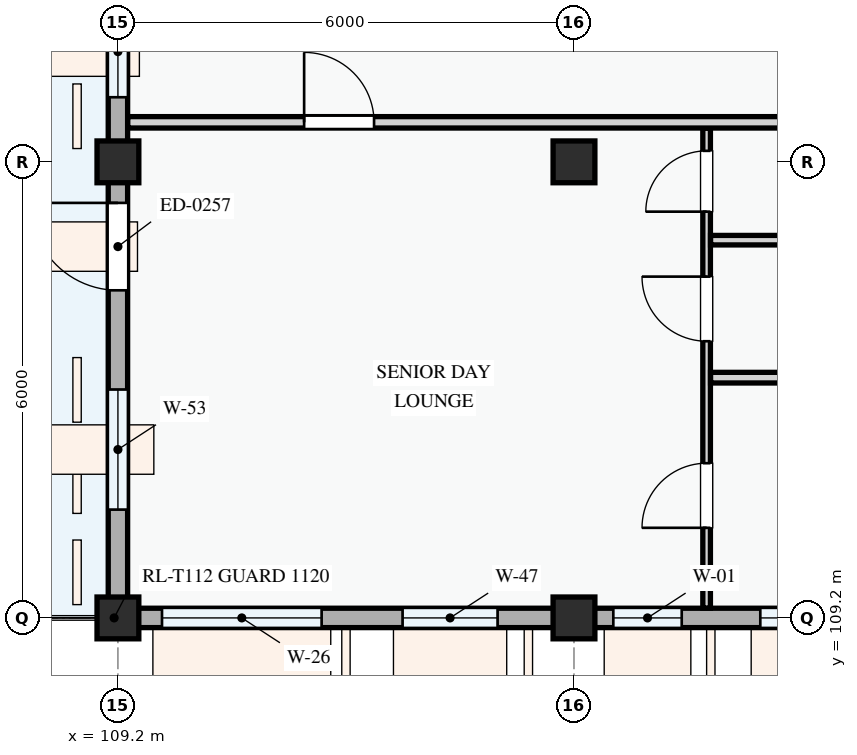
"""IFC4 building model, lengths in metres.
Left out: names, types, materials, properties, quantities, classifications, styles, units other than length and angle.
Written with IfcOpenShell. Run it as: python <this file> out.ifc"""

import sys

from ifc_helpers import new_model, si_unit, direction, frame, frame_2d, origin, origin_2d, place, context, subcontext, project, spatial, rectangle, extrude, element, fill, save


model = new_model("IFC4")
c1 = context("Model", 3, precision=1e-05, world=origin(), true_north=direction((0.0, 1.0)))
c2 = subcontext(c1, "Body", "Model", "MODEL_VIEW")
j1 = project(units=[si_unit("LENGTHUNIT", "METRE"), si_unit("PLANEANGLEUNIT", "RADIAN")], contexts=[c1])
p1 = place(None, origin())
s1 = spatial("IfcSite", under=j1, at=p1, CompositionType="ELEMENT")
p2 = place(p1, origin())
s2 = spatial("IfcBuilding", under=s1, at=p2, CompositionType="ELEMENT")
p3 = place(p2, frame((0.0, 0.0, 34.5)))
s3 = spatial("IfcBuildingStorey", under=s2, at=p3, CompositionType="ELEMENT", Elevation=34.5)
for number, where, z_axis, x_axis in (
    (1, (109.2, 109.2, 0.0), (0.0, 0.0, 1.0), (1.0, 0.0, 0.0)),
    (2, (109.2, 115.2, 0.0), (0.0, 0.0, 1.0), (1.0, 0.0, 0.0)),
    (3, (115.2, 109.2, 0.0), (0.0, 0.0, 1.0), (1.0, 0.0, 0.0)),
    (4, (115.2, 115.2, 0.0), (0.0, 0.0, 1.0), (1.0, 0.0, 0.0)),
):
    element("IfcColumn", number, at=place(p3, frame(where, z_axis=z_axis, x_axis=x_axis)), inside=s3, PredefinedType="COLUMN", context=c2, shape_type="SweptSolid", body=[
        extrude(rectangle(XDim=0.55, YDim=0.55, at=origin_2d()), origin(), (0.0, 0.0, 1.0), 3.3),
    ])
p4 = place(p3, frame((109.2, 123.6, 0.0), z_axis=(0.0, 0.0, 1.0), x_axis=(0.0, -1.0, 0.0)))
e5 = element("IfcWall", 5, at=p4, inside=s3, PredefinedType="STANDARD", context=c2, shape_type="SweptSolid", body=[
    extrude(rectangle(XDim=8.4, YDim=0.255, at=frame_2d((4.2, 0.0))), origin(), (0.0, 0.0, 1.0), 2.425),
])
p5 = place(p4, frame((0.54, 0.0, 0.0)))
e6 = element("IfcOpeningElement", 6, at=p5, cuts=e5, PredefinedType="OPENING", context=c2, shape_type="SweptSolid", body=[
    extrude(rectangle(XDim=1.35, YDim=2.2, at=frame_2d((0.675, 1.1))), frame((0.0, 0.137, 0.0), z_axis=(0.0, -1.0, 0.0), x_axis=(1.0, 0.0, 0.0)), (0.0, 0.0, 1.0), 0.275),
])
p6 = place(p4, frame((2.85, 0.0, 0.78)))
e7 = element("IfcOpeningElement", 7, at=p6, cuts=e5, PredefinedType="OPENING", context=c2, shape_type="SweptSolid", body=[
    extrude(rectangle(XDim=2.28, YDim=1.46, at=frame_2d((1.14, 0.73))), frame((0.0, 0.137, 0.0), z_axis=(0.0, -1.0, 0.0), x_axis=(1.0, 0.0, 0.0)), (0.0, 0.0, 1.0), 0.275),
])
p7 = place(p4, frame((6.35, 0.0, 0.78)))
e8 = element("IfcOpeningElement", 8, at=p7, cuts=e5, PredefinedType="OPENING", context=c2, shape_type="SweptSolid", body=[
    extrude(rectangle(XDim=1.2, YDim=1.35, at=frame_2d((0.6, 0.675))), frame((0.0, 0.137, 0.0), z_axis=(0.0, -1.0, 0.0), x_axis=(1.0, 0.0, 0.0)), (0.0, 0.0, 1.0), 0.275),
])
p8 = place(p3, frame((109.2, 115.2, 0.0), z_axis=(0.0, 0.0, 1.0), x_axis=(0.0, -1.0, 0.0)))
e9 = element("IfcWall", 9, at=p8, inside=s3, PredefinedType="STANDARD", context=c2, shape_type="SweptSolid", body=[
    extrude(rectangle(XDim=6.0, YDim=0.255, at=frame_2d((3.0, 0.0))), origin(), (0.0, 0.0, 1.0), 2.575),
])
p9 = place(p8, frame((0.54, 0.0, 0.0)))
e10 = element("IfcOpeningElement", 10, at=p9, cuts=e9, PredefinedType="OPENING", context=c2, shape_type="SweptSolid", body=[
    extrude(rectangle(XDim=1.15, YDim=2.15, at=frame_2d((0.575, 1.075))), frame((0.0, 0.137, 0.0), z_axis=(0.0, -1.0, 0.0), x_axis=(1.0, 0.0, 0.0)), (0.0, 0.0, 1.0), 0.275),
])
p10 = place(p8, frame((2.995, 0.0, 0.78)))
e11 = element("IfcOpeningElement", 11, at=p10, cuts=e9, PredefinedType="OPENING", context=c2, shape_type="SweptSolid", body=[
    extrude(rectangle(XDim=1.58, YDim=1.48, at=frame_2d((0.79, 0.74))), frame((0.0, 0.137, 0.0), z_axis=(0.0, -1.0, 0.0), x_axis=(1.0, 0.0, 0.0)), (0.0, 0.0, 1.0), 0.275),
])
p11 = place(p3, frame((109.2, 109.2, 0.0), z_axis=(0.0, 0.0, 1.0), x_axis=(1.0, 0.0, 0.0)))
e12 = element("IfcWall", 12, at=p11, inside=s3, PredefinedType="STANDARD", context=c2, shape_type="SweptSolid", body=[
    extrude(rectangle(XDim=6.0, YDim=0.255, at=frame_2d((3.0, 0.0))), origin(), (0.0, 0.0, 1.0), 2.525),
])
p12 = place(p11, frame((0.58, 0.0, 0.78)))
e13 = element("IfcOpeningElement", 13, at=p12, cuts=e12, PredefinedType="OPENING", context=c2, shape_type="SweptSolid", body=[
    extrude(rectangle(XDim=2.1, YDim=1.55, at=frame_2d((1.05, 0.775))), frame((0.0, 0.137, 0.0), z_axis=(0.0, -1.0, 0.0), x_axis=(1.0, 0.0, 0.0)), (0.0, 0.0, 1.0), 0.275),
])
p13 = place(p11, frame((3.745, 0.0, 0.78)))
e14 = element("IfcOpeningElement", 14, at=p13, cuts=e12, PredefinedType="OPENING", context=c2, shape_type="SweptSolid", body=[
    extrude(rectangle(XDim=1.25, YDim=1.45, at=frame_2d((0.625, 0.725))), frame((0.0, 0.137, 0.0), z_axis=(0.0, -1.0, 0.0), x_axis=(1.0, 0.0, 0.0)), (0.0, 0.0, 1.0), 0.275),
])
p14 = place(p3, frame((115.2, 109.2, 0.0), z_axis=(0.0, 0.0, 1.0), x_axis=(1.0, 0.0, 0.0)))
e15 = element("IfcWall", 15, at=p14, inside=s3, PredefinedType="STANDARD", context=c2, shape_type="SweptSolid", body=[
    extrude(rectangle(XDim=8.4, YDim=0.255, at=frame_2d((4.2, 0.0))), origin(), (0.0, 0.0, 1.0), 2.375),
])
p15 = place(p14, frame((0.518, 0.0, 0.78)))
e16 = element("IfcOpeningElement", 16, at=p15, cuts=e15, PredefinedType="OPENING", context=c2, shape_type="SweptSolid", body=[
    extrude(rectangle(XDim=0.9, YDim=1.2, at=frame_2d((0.45, 0.6))), frame((0.0, 0.137, 0.0), z_axis=(0.0, -1.0, 0.0), x_axis=(1.0, 0.0, 0.0)), (0.0, 0.0, 1.0), 0.275),
])
p16 = place(p14, frame((2.451, 0.0, 0.78)))
e17 = element("IfcOpeningElement", 17, at=p16, cuts=e15, PredefinedType="OPENING", context=c2, shape_type="SweptSolid", body=[
    extrude(rectangle(XDim=1.1, YDim=1.3, at=frame_2d((0.55, 0.65))), frame((0.0, 0.137, 0.0), z_axis=(0.0, -1.0, 0.0), x_axis=(1.0, 0.0, 0.0)), (0.0, 0.0, 1.0), 0.275),
])
p17 = place(p14, frame((4.849, 0.0, 0.78)))
e18 = element("IfcOpeningElement", 18, at=p17, cuts=e15, PredefinedType="OPENING", context=c2, shape_type="SweptSolid", body=[
    extrude(rectangle(XDim=1.05, YDim=1.2, at=frame_2d((0.525, 0.6))), frame((0.0, 0.137, 0.0), z_axis=(0.0, -1.0, 0.0), x_axis=(1.0, 0.0, 0.0)), (0.0, 0.0, 1.0), 0.275),
])
p18 = place(p14, frame((6.92, 0.0, 0.78)))
e19 = element("IfcOpeningElement", 19, at=p18, cuts=e15, PredefinedType="OPENING", context=c2, shape_type="SweptSolid", body=[
    extrude(rectangle(XDim=1.0, YDim=1.25, at=frame_2d((0.5, 0.625))), frame((0.0, 0.137, 0.0), z_axis=(0.0, -1.0, 0.0), x_axis=(1.0, 0.0, 0.0)), (0.0, 0.0, 1.0), 0.275),
])
p19 = place(p3, frame((116.945, 109.33, 0.0), z_axis=(0.0, 0.0, 1.0), x_axis=(0.0, 1.0, 0.0)))
e20 = element("IfcWall", 20, at=p19, inside=s3, PredefinedType="PARTITIONING", context=c2, shape_type="SweptSolid", body=[
    extrude(rectangle(XDim=6.313, YDim=0.1, at=frame_2d((3.157, 0.0))), origin(), (0.0, 0.0, 1.0), 3.0),
])
p20 = place(p19, frame((1.056, 0.0, 0.0)))
e21 = element("IfcOpeningElement", 21, at=p20, cuts=e20, PredefinedType="OPENING", context=c2, shape_type="SweptSolid", body=[
    extrude(rectangle(XDim=0.85, YDim=2.1, at=frame_2d((0.425, 1.05))), frame((0.0, 0.06, 0.0), z_axis=(0.0, -1.0, 0.0), x_axis=(1.0, 0.0, 0.0)), (0.0, 0.0, 1.0), 0.12),
])
p21 = place(p19, frame((3.511, 0.0, 0.0)))
e22 = element("IfcOpeningElement", 22, at=p21, cuts=e20, PredefinedType="OPENING", context=c2, shape_type="SweptSolid", body=[
    extrude(rectangle(XDim=0.85, YDim=2.1, at=frame_2d((0.425, 1.05))), frame((0.0, 0.06, 0.0), z_axis=(0.0, -1.0, 0.0), x_axis=(1.0, 0.0, 0.0)), (0.0, 0.0, 1.0), 0.12),
])
p22 = place(p19, frame((5.215, 0.0, 0.0)))
e23 = element("IfcOpeningElement", 23, at=p22, cuts=e20, PredefinedType="OPENING", context=c2, shape_type="SweptSolid", body=[
    extrude(rectangle(XDim=0.8, YDim=2.1, at=frame_2d((0.4, 1.05))), frame((0.0, 0.06, 0.0), z_axis=(0.0, -1.0, 0.0), x_axis=(1.0, 0.0, 0.0)), (0.0, 0.0, 1.0), 0.12),
])
p23 = place(p3, frame((116.997, 112.361, 0.0), z_axis=(0.0, 0.0, 1.0), x_axis=(1.0, 0.0, 0.0)))
e24 = element("IfcWall", 24, at=p23, inside=s3, PredefinedType="PARTITIONING", context=c2, shape_type="SweptSolid", body=[
    extrude(rectangle(XDim=4.739, YDim=0.14, at=frame_2d((2.369, 0.0))), origin(), (0.0, 0.0, 1.0), 3.0),
])
p24 = place(p3, frame((116.997, 114.17, 0.0), z_axis=(0.0, 0.0, 1.0), x_axis=(1.0, 0.0, 0.0)))
e25 = element("IfcWall", 25, at=p24, inside=s3, PredefinedType="PARTITIONING", context=c2, shape_type="SweptSolid", body=[
    extrude(rectangle(XDim=4.739, YDim=0.125, at=frame_2d((2.369, 0.0))), origin(), (0.0, 0.0, 1.0), 3.0),
])
p25 = place(p3, frame((109.33, 115.72, 0.0), z_axis=(0.0, 0.0, 1.0), x_axis=(1.0, 0.0, 0.0)))
e26 = element("IfcWall", 26, at=p25, inside=s3, PredefinedType="PARTITIONING", context=c2, shape_type="SweptSolid", body=[
    extrude(rectangle(XDim=40.72, YDim=0.15, at=frame_2d((20.36, 0.0))), origin(), (0.0, 0.0, 1.0), 3.0),
])
p26 = place(p25, frame((2.32, 0.0, 0.0)))
e27 = element("IfcOpeningElement", 27, at=p26, cuts=e26, PredefinedType="OPENING", context=c2, shape_type="SweptSolid", body=[
    extrude(rectangle(XDim=0.92, YDim=2.1, at=frame_2d((0.46, 1.05))), frame((0.0, 0.085, 0.0), z_axis=(0.0, -1.0, 0.0), x_axis=(1.0, 0.0, 0.0)), (0.0, 0.0, 1.0), 0.17),
])
p27 = place(p25, frame((16.851, 0.0, 0.0)))
e28 = element("IfcOpeningElement", 28, at=p27, cuts=e26, PredefinedType="OPENING", context=c2, shape_type="SweptSolid", body=[
    extrude(rectangle(XDim=0.92, YDim=2.1, at=frame_2d((0.46, 1.05))), frame((0.0, 0.085, 0.0), z_axis=(0.0, -1.0, 0.0), x_axis=(1.0, 0.0, 0.0)), (0.0, 0.0, 1.0), 0.17),
])
p28 = place(p25, frame((31.258, 0.0, 0.0)))
e29 = element("IfcOpeningElement", 29, at=p28, cuts=e26, PredefinedType="OPENING", context=c2, shape_type="SweptSolid", body=[
    extrude(rectangle(XDim=0.96, YDim=2.12, at=frame_2d((0.48, 1.06))), frame((0.0, 0.085, 0.0), z_axis=(0.0, -1.0, 0.0), x_axis=(1.0, 0.0, 0.0)), (0.0, 0.0, 1.0), 0.17),
])
p29 = place(p7, origin())
e30 = element("IfcWindow", 30, at=p29, inside=s3, PartitioningType="SINGLE_PANEL", PredefinedType="WINDOW", context=c2, shape_type="SweptSolid", body=[
    extrude(rectangle(XDim=1.2, YDim=1.35, at=frame_2d((0.6, 0.675))), frame((0.0, 0.03, 0.0), z_axis=(0.0, -1.0, 0.0), x_axis=(1.0, 0.0, 0.0)), (0.0, 0.0, 1.0), 0.06),
])
fill(e8, e30)
p30 = place(p9, frame((1.15, 0.0, 0.0), z_axis=(0.0, 0.0, 1.0), x_axis=(-1.0, 0.0, 0.0)))
e31 = element("IfcDoor", 31, at=p30, inside=s3, OperationType="SINGLE_SWING_RIGHT", PredefinedType="DOOR", context=c2, shape_type="SweptSolid", body=[
    extrude(rectangle(XDim=1.15, YDim=2.15, at=frame_2d((0.575, 1.075))), frame((0.0, 0.025, 0.0), z_axis=(0.0, -1.0, 0.0), x_axis=(1.0, 0.0, 0.0)), (0.0, 0.0, 1.0), 0.05),
])
fill(e10, e31)
p31 = place(p10, origin())
e32 = element("IfcWindow", 32, at=p31, inside=s3, PartitioningType="SINGLE_PANEL", PredefinedType="WINDOW", context=c2, shape_type="SweptSolid", body=[
    extrude(rectangle(XDim=1.58, YDim=1.48, at=frame_2d((0.79, 0.74))), frame((0.0, 0.03, 0.0), z_axis=(0.0, -1.0, 0.0), x_axis=(1.0, 0.0, 0.0)), (0.0, 0.0, 1.0), 0.06),
])
fill(e11, e32)
p32 = place(p12, origin())
e33 = element("IfcWindow", 33, at=p32, inside=s3, PartitioningType="DOUBLE_PANEL_VERTICAL", PredefinedType="WINDOW", context=c2, shape_type="SweptSolid", body=[
    extrude(rectangle(XDim=2.1, YDim=1.55, at=frame_2d((1.05, 0.775))), frame((0.0, 0.03, 0.0), z_axis=(0.0, -1.0, 0.0), x_axis=(1.0, 0.0, 0.0)), (0.0, 0.0, 1.0), 0.06),
])
fill(e13, e33)
p33 = place(p13, origin())
e34 = element("IfcWindow", 34, at=p33, inside=s3, PartitioningType="SINGLE_PANEL", PredefinedType="WINDOW", context=c2, shape_type="SweptSolid", body=[
    extrude(rectangle(XDim=1.25, YDim=1.45, at=frame_2d((0.625, 0.725))), frame((0.0, 0.03, 0.0), z_axis=(0.0, -1.0, 0.0), x_axis=(1.0, 0.0, 0.0)), (0.0, 0.0, 1.0), 0.06),
])
fill(e14, e34)
p34 = place(p15, origin())
e35 = element("IfcWindow", 35, at=p34, inside=s3, PartitioningType="SINGLE_PANEL", PredefinedType="WINDOW", context=c2, shape_type="SweptSolid", body=[
    extrude(rectangle(XDim=0.9, YDim=1.2, at=frame_2d((0.45, 0.6))), frame((0.0, 0.03, 0.0), z_axis=(0.0, -1.0, 0.0), x_axis=(1.0, 0.0, 0.0)), (0.0, 0.0, 1.0), 0.06),
])
fill(e16, e35)
p35 = place(p16, origin())
e36 = element("IfcWindow", 36, at=p35, inside=s3, PartitioningType="SINGLE_PANEL", PredefinedType="WINDOW", context=c2, shape_type="SweptSolid", body=[
    extrude(rectangle(XDim=1.1, YDim=1.3, at=frame_2d((0.55, 0.65))), frame((0.0, 0.03, 0.0), z_axis=(0.0, -1.0, 0.0), x_axis=(1.0, 0.0, 0.0)), (0.0, 0.0, 1.0), 0.06),
])
fill(e17, e36)
p36 = place(p20, origin())
e37 = element("IfcDoor", 37, at=p36, inside=s3, OperationType="SINGLE_SWING_LEFT", PredefinedType="DOOR", context=c2, shape_type="SweptSolid", body=[
    extrude(rectangle(XDim=0.85, YDim=2.1, at=frame_2d((0.425, 1.05))), frame((0.0, 0.025, 0.0), z_axis=(0.0, -1.0, 0.0), x_axis=(1.0, 0.0, 0.0)), (0.0, 0.0, 1.0), 0.05),
])
fill(e21, e37)
p37 = place(p21, origin())
e38 = element("IfcDoor", 38, at=p37, inside=s3, OperationType="SINGLE_SWING_RIGHT", PredefinedType="DOOR", context=c2, shape_type="SweptSolid", body=[
    extrude(rectangle(XDim=0.85, YDim=2.1, at=frame_2d((0.425, 1.05))), frame((0.0, 0.025, 0.0), z_axis=(0.0, -1.0, 0.0), x_axis=(1.0, 0.0, 0.0)), (0.0, 0.0, 1.0), 0.05),
])
fill(e22, e38)
p38 = place(p22, origin())
e39 = element("IfcDoor", 39, at=p38, inside=s3, OperationType="SINGLE_SWING_LEFT", PredefinedType="DOOR", context=c2, shape_type="SweptSolid", body=[
    extrude(rectangle(XDim=0.8, YDim=2.1, at=frame_2d((0.4, 1.05))), frame((0.0, 0.025, 0.0), z_axis=(0.0, -1.0, 0.0), x_axis=(1.0, 0.0, 0.0)), (0.0, 0.0, 1.0), 0.05),
])
fill(e23, e39)
p39 = place(p26, origin())
e40 = element("IfcDoor", 40, at=p39, inside=s3, OperationType="SINGLE_SWING_LEFT", PredefinedType="DOOR", context=c2, shape_type="SweptSolid", body=[
    extrude(rectangle(XDim=0.92, YDim=2.1, at=frame_2d((0.46, 1.05))), frame((0.0, 0.025, 0.0), z_axis=(0.0, -1.0, 0.0), x_axis=(1.0, 0.0, 0.0)), (0.0, 0.0, 1.0), 0.05),
])
fill(e27, e40)
save(model, sys.argv[1])
